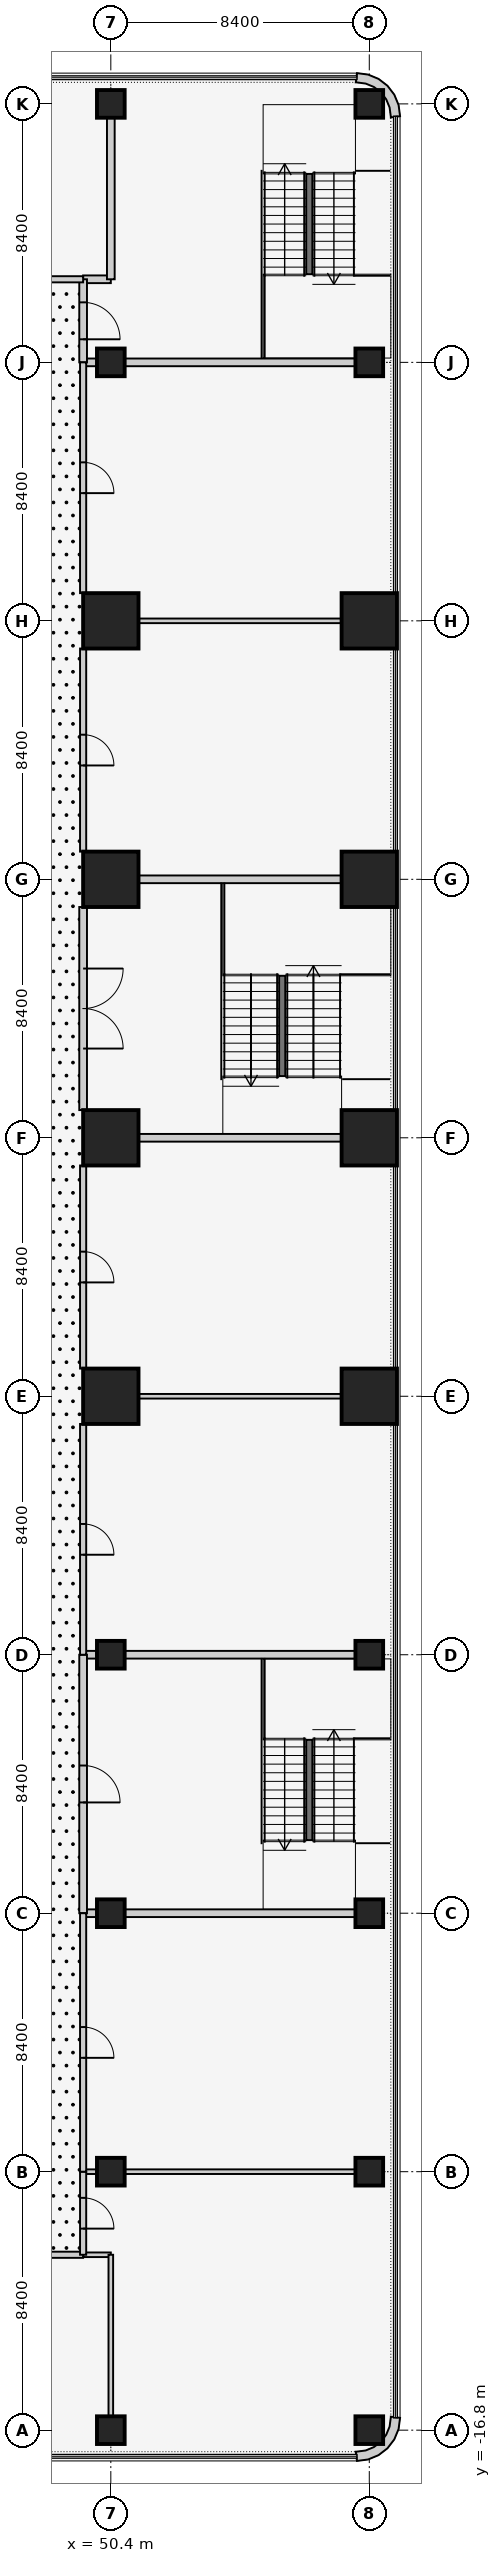
"""IFC4 building model, lengths in metres.
Left out: names, types, materials, properties, quantities, classifications, styles, units other than length and angle.
Written with IfcOpenShell. Run it as: python <this file> out.ifc"""

import sys

from ifc_helpers import new_model, si_unit, direction, frame, frame_2d, origin, origin_2d, place, context, subcontext, project, spatial, polyline, rectangle, outline, extrude, element, fill, save


model = new_model("IFC4")
c1 = context("Model", 3, precision=1e-05, world=origin(), true_north=direction((0.0, 1.0)))
c2 = subcontext(c1, "Body", "Model", "MODEL_VIEW")
j1 = project(units=[si_unit("LENGTHUNIT", "METRE"), si_unit("PLANEANGLEUNIT", "RADIAN")], contexts=[c1])
p1 = place(None, origin())
s1 = spatial("IfcSite", under=j1, at=p1, CompositionType="ELEMENT")
p2 = place(p1, origin())
s2 = spatial("IfcBuilding", under=s1, at=p2, CompositionType="ELEMENT")
p3 = place(p2, frame((0.0, 0.0, 6.0)))
s3 = spatial("IfcBuildingStorey", under=s2, at=p3, CompositionType="ELEMENT", Elevation=6.0)
for number, where, z_axis, x_axis in (
    (1, (50.4, -16.8, 0.0), (0.0, 0.0, 1.0), (1.0, 0.0, 0.0)),
    (2, (50.4, -8.4, 0.0), (0.0, 0.0, 1.0), (1.0, 0.0, 0.0)),
    (3, (50.4, 0.0, 0.0), (0.0, 0.0, 1.0), (1.0, 0.0, 0.0)),
    (4, (50.4, 8.4, 0.0), (0.0, 0.0, 1.0), (1.0, 0.0, 0.0)),
):
    element("IfcColumn", number, at=place(p3, frame(where, z_axis=z_axis, x_axis=x_axis)), inside=s3, PredefinedType="COLUMN", context=c2, shape_type="SweptSolid", body=[
        extrude(rectangle(XDim=0.9, YDim=0.9, at=origin_2d()), origin(), (0.0, 0.0, 1.0), 4.5),
    ])
for number, where, z_axis, x_axis in (
    (5, (50.4, 16.8, 0.0), (0.0, 0.0, 1.0), (1.0, 0.0, 0.0)),
    (6, (50.4, 25.2, 0.0), (0.0, 0.0, 1.0), (1.0, 0.0, 0.0)),
    (7, (50.4, 33.6, 0.0), (0.0, 0.0, 1.0), (1.0, 0.0, 0.0)),
    (8, (50.4, 42.0, 0.0), (0.0, 0.0, 1.0), (1.0, 0.0, 0.0)),
):
    element("IfcColumn", number, at=place(p3, frame(where, z_axis=z_axis, x_axis=x_axis)), inside=s3, PredefinedType="COLUMN", context=c2, shape_type="SweptSolid", body=[
        extrude(rectangle(XDim=1.8, YDim=1.8, at=origin_2d()), origin(), (0.0, 0.0, 1.0), 4.5),
    ])
for number, where, z_axis, x_axis in (
    (9, (50.4, 50.4, 0.0), (0.0, 0.0, 1.0), (1.0, 0.0, 0.0)),
    (10, (50.4, 58.8, 0.0), (0.0, 0.0, 1.0), (1.0, 0.0, 0.0)),
    (11, (58.8, -16.8, 0.0), (0.0, 0.0, 1.0), (1.0, 0.0, 0.0)),
    (12, (58.8, -8.4, 0.0), (0.0, 0.0, 1.0), (1.0, 0.0, 0.0)),
    (13, (58.8, 0.0, 0.0), (0.0, 0.0, 1.0), (1.0, 0.0, 0.0)),
    (14, (58.8, 8.4, 0.0), (0.0, 0.0, 1.0), (1.0, 0.0, 0.0)),
):
    element("IfcColumn", number, at=place(p3, frame(where, z_axis=z_axis, x_axis=x_axis)), inside=s3, PredefinedType="COLUMN", context=c2, shape_type="SweptSolid", body=[
        extrude(rectangle(XDim=0.9, YDim=0.9, at=origin_2d()), origin(), (0.0, 0.0, 1.0), 4.5),
    ])
for number, where, z_axis, x_axis in (
    (15, (58.8, 16.8, 0.0), (0.0, 0.0, 1.0), (1.0, 0.0, 0.0)),
    (16, (58.8, 25.2, 0.0), (0.0, 0.0, 1.0), (1.0, 0.0, 0.0)),
    (17, (58.8, 33.6, 0.0), (0.0, 0.0, 1.0), (1.0, 0.0, 0.0)),
    (18, (58.8, 42.0, 0.0), (0.0, 0.0, 1.0), (1.0, 0.0, 0.0)),
):
    element("IfcColumn", number, at=place(p3, frame(where, z_axis=z_axis, x_axis=x_axis)), inside=s3, PredefinedType="COLUMN", context=c2, shape_type="SweptSolid", body=[
        extrude(rectangle(XDim=1.8, YDim=1.8, at=origin_2d()), origin(), (0.0, 0.0, 1.0), 4.5),
    ])
for number, where, z_axis, x_axis in (
    (19, (58.8, 50.4, 0.0), (0.0, 0.0, 1.0), (1.0, 0.0, 0.0)),
    (20, (58.8, 58.8, 0.0), (0.0, 0.0, 1.0), (1.0, 0.0, 0.0)),
):
    element("IfcColumn", number, at=place(p3, frame(where, z_axis=z_axis, x_axis=x_axis)), inside=s3, PredefinedType="COLUMN", context=c2, shape_type="SweptSolid", body=[
        extrude(rectangle(XDim=0.9, YDim=0.9, at=origin_2d()), origin(), (0.0, 0.0, 1.0), 4.5),
    ])
p4 = place(p3, frame((59.648, 58.355, 0.0), z_axis=(0.0, 0.0, 1.0), x_axis=(0.707106781187, 0.707106781187, 0.0)))
e21 = element("IfcWall", 21, at=p4, inside=s3, PredefinedType="SOLIDWALL", context=c2, shape_type="SweptSolid", body=[
    extrude(outline(polyline([(0.139, 1.904), (-0.101, 1.72), (-0.087, 1.706), (0.1, 1.463), (0.209, 1.198), (0.246, 0.914), (0.209, 0.63), (0.1, 0.365), (-0.087, 0.122), (-0.101, 0.108), (0.139, -0.076), (0.362, 0.214), (0.502, 0.552), (0.549, 0.914), (0.502, 1.276), (0.362, 1.614), (0.139, 1.904)])), origin(), (0.0, 0.0, 1.0), 4.3),
])
p5 = place(p3, frame((58.355, -17.648, 0.0), z_axis=(0.0, 0.0, 1.0), x_axis=(0.707106781187, -0.707106781187, 0.0)))
e22 = element("IfcWall", 22, at=p5, inside=s3, PredefinedType="SOLIDWALL", context=c2, shape_type="SweptSolid", body=[
    extrude(outline(polyline([(0.139, 1.904), (-0.101, 1.72), (-0.087, 1.706), (0.1, 1.463), (0.209, 1.198), (0.246, 0.914), (0.209, 0.63), (0.1, 0.365), (-0.087, 0.122), (-0.101, 0.108), (0.139, -0.076), (0.362, 0.214), (0.502, 0.552), (0.549, 0.914), (0.502, 1.276), (0.362, 1.614), (0.139, 1.904)])), origin(), (0.0, 0.0, 1.0), 4.3),
])
for number, where, z_axis, x_axis in (
    (23, (57.9, 25.2, 0.0), (0.0, 0.0, 1.0), (-1.0, 0.0, 0.0)),
    (24, (51.3, 33.6, 0.0), (0.0, 0.0, 1.0), (1.0, 0.0, 0.0)),
):
    element("IfcWall", number, at=place(p3, frame(where, z_axis=z_axis, x_axis=x_axis)), inside=s3, PredefinedType="SOLIDWALL", context=c2, shape_type="SweptSolid", body=[
        extrude(rectangle(XDim=6.6, YDim=0.25, at=frame_2d((3.3, 0.0))), origin(), (0.0, 0.0, 1.0), 3.543),
    ])
p6 = place(p3, frame((49.5, 26.1, 0.0), z_axis=(0.0, 0.0, 1.0), x_axis=(0.0, 1.0, 0.0)))
e25 = element("IfcWall", 25, at=p6, inside=s3, PredefinedType="SOLIDWALL", context=c2, shape_type="SweptSolid", body=[
    extrude(rectangle(XDim=6.6, YDim=0.25, at=frame_2d((3.3, 0.0))), origin(), (0.0, 0.0, 1.0), 4.3),
])
p7 = place(p6, frame((2.0, 0.0, 0.0)))
e26 = element("IfcOpeningElement", 26, at=p7, cuts=e25, PredefinedType="OPENING", context=c2, shape_type="SweptSolid", body=[
    extrude(rectangle(XDim=2.6, YDim=2.4, at=frame_2d((1.3, 1.2))), frame((0.0, 0.135, 0.0), z_axis=(0.0, -1.0, 0.0), x_axis=(1.0, 0.0, 0.0)), (0.0, 0.0, 1.0), 0.27),
])
p8 = place(p3, frame((49.95, 0.0, 0.0), z_axis=(0.0, 0.0, 1.0), x_axis=(-1.0, 0.0, 0.0)))
e27 = element("IfcWall", 27, at=p8, inside=s3, PredefinedType="SOLIDWALL", context=c2, shape_type="SweptSolid", body=[
    extrude(rectangle(XDim=0.45, YDim=0.25, at=frame_2d((0.225, 0.0))), origin(), (0.0, 0.0, 1.0), 3.543),
])
p9 = place(p3, frame((58.35, 0.0, 0.0), z_axis=(0.0, 0.0, 1.0), x_axis=(-1.0, 0.0, 0.0)))
e28 = element("IfcWall", 28, at=p9, inside=s3, PredefinedType="SOLIDWALL", context=c2, shape_type="SweptSolid", body=[
    extrude(rectangle(XDim=7.5, YDim=0.25, at=frame_2d((3.75, 0.0))), origin(), (0.0, 0.0, 1.0), 3.543),
])
p10 = place(p3, frame((49.5, 8.4, 0.0), z_axis=(0.0, 0.0, 1.0), x_axis=(1.0, 0.0, 0.0)))
e29 = element("IfcWall", 29, at=p10, inside=s3, PredefinedType="SOLIDWALL", context=c2, shape_type="SweptSolid", body=[
    extrude(rectangle(XDim=0.45, YDim=0.25, at=frame_2d((0.225, 0.0))), origin(), (0.0, 0.0, 1.0), 3.543),
])
p11 = place(p3, frame((50.85, 8.4, 0.0), z_axis=(0.0, 0.0, 1.0), x_axis=(1.0, 0.0, 0.0)))
e30 = element("IfcWall", 30, at=p11, inside=s3, PredefinedType="SOLIDWALL", context=c2, shape_type="SweptSolid", body=[
    extrude(rectangle(XDim=7.5, YDim=0.25, at=frame_2d((3.75, 0.0))), origin(), (0.0, 0.0, 1.0), 3.543),
])
p12 = place(p3, frame((49.5, 0.0, 0.0), z_axis=(0.0, 0.0, 1.0), x_axis=(0.0, 1.0, 0.0)))
e31 = element("IfcWall", 31, at=p12, inside=s3, PredefinedType="SOLIDWALL", context=c2, shape_type="SweptSolid", body=[
    extrude(rectangle(XDim=8.4, YDim=0.25, at=frame_2d((4.2, 0.0))), origin(), (0.0, 0.0, 1.0), 4.3),
])
p13 = place(p12, frame((3.6, 0.0, 0.0)))
e32 = element("IfcOpeningElement", 32, at=p13, cuts=e31, PredefinedType="OPENING", context=c2, shape_type="SweptSolid", body=[
    extrude(rectangle(XDim=1.2, YDim=2.1, at=frame_2d((0.6, 1.05))), frame((0.0, 0.135, 0.0), z_axis=(0.0, -1.0, 0.0), x_axis=(1.0, 0.0, 0.0)), (0.0, 0.0, 1.0), 0.27),
])
p14 = place(p3, frame((49.95, 50.4, 0.0), z_axis=(0.0, 0.0, 1.0), x_axis=(-1.0, 0.0, 0.0)))
e33 = element("IfcWall", 33, at=p14, inside=s3, PredefinedType="SOLIDWALL", context=c2, shape_type="SweptSolid", body=[
    extrude(rectangle(XDim=0.45, YDim=0.25, at=frame_2d((0.225, 0.0))), origin(), (0.0, 0.0, 1.0), 3.543),
])
p15 = place(p3, frame((58.35, 50.4, 0.0), z_axis=(0.0, 0.0, 1.0), x_axis=(-1.0, 0.0, 0.0)))
e34 = element("IfcWall", 34, at=p15, inside=s3, PredefinedType="SOLIDWALL", context=c2, shape_type="SweptSolid", body=[
    extrude(rectangle(XDim=7.5, YDim=0.25, at=frame_2d((3.75, 0.0))), origin(), (0.0, 0.0, 1.0), 3.543),
])
p16 = place(p3, frame((49.5, 53.1, 0.0), z_axis=(0.0, 0.0, 1.0), x_axis=(1.0, 0.0, 0.0)))
e35 = element("IfcWall", 35, at=p16, inside=s3, PredefinedType="SOLIDWALL", context=c2, shape_type="SweptSolid", body=[
    extrude(rectangle(XDim=0.9, YDim=0.25, at=frame_2d((0.45, 0.0))), origin(), (0.0, 0.0, 1.0), 4.3),
])
p17 = place(p3, frame((50.4, 53.1, 0.0), z_axis=(0.0, 0.0, 1.0), x_axis=(0.0, 1.0, 0.0)))
e36 = element("IfcWall", 36, at=p17, inside=s3, PredefinedType="SOLIDWALL", context=c2, shape_type="SweptSolid", body=[
    extrude(rectangle(XDim=5.25, YDim=0.25, at=frame_2d((2.625, 0.0))), origin(), (0.0, 0.0, 1.0), 3.543),
])
p18 = place(p3, frame((49.5, 50.4, 0.0), z_axis=(0.0, 0.0, 1.0), x_axis=(0.0, 1.0, 0.0)))
e37 = element("IfcWall", 37, at=p18, inside=s3, PredefinedType="SOLIDWALL", context=c2, shape_type="SweptSolid", body=[
    extrude(rectangle(XDim=2.7, YDim=0.25, at=frame_2d((1.35, 0.0))), origin(), (0.0, 0.0, 1.0), 4.3),
])
p19 = place(p18, frame((0.75, 0.0, 0.0)))
e38 = element("IfcOpeningElement", 38, at=p19, cuts=e37, PredefinedType="OPENING", context=c2, shape_type="SweptSolid", body=[
    extrude(rectangle(XDim=1.2, YDim=2.1, at=frame_2d((0.6, 1.05))), frame((0.0, 0.135, 0.0), z_axis=(0.0, -1.0, 0.0), x_axis=(1.0, 0.0, 0.0)), (0.0, 0.0, 1.0), 0.27),
])
p20 = place(p3, frame((49.5, -11.1, 0.0), z_axis=(0.0, 0.0, 1.0), x_axis=(1.0, 0.0, 0.0)))
e39 = element("IfcWall", 39, at=p20, inside=s3, PredefinedType="PARTITIONING", context=c2, shape_type="SweptSolid", body=[
    extrude(rectangle(XDim=0.9, YDim=0.15, at=frame_2d((0.45, 0.0))), origin(), (0.0, 0.0, 1.0), 4.3),
])
p21 = place(p3, frame((50.4, -11.1, 0.0), z_axis=(0.0, 0.0, 1.0), x_axis=(0.0, -1.0, 0.0)))
e40 = element("IfcWall", 40, at=p21, inside=s3, PredefinedType="PARTITIONING", context=c2, shape_type="SweptSolid", body=[
    extrude(rectangle(XDim=5.25, YDim=0.15, at=frame_2d((2.625, 0.0))), origin(), (0.0, 0.0, 1.0), 3.543),
])
p22 = place(p3, frame((47.1, -11.1, 0.0), z_axis=(0.0, 0.0, 1.0), x_axis=(1.0, 0.0, 0.0)))
e41 = element("IfcWall", 41, at=p22, inside=s3, PredefinedType="PARTITIONING", context=c2, shape_type="SweptSolid", body=[
    extrude(rectangle(XDim=2.4, YDim=0.2, at=frame_2d((1.2, 0.0))), origin(), (0.0, 0.0, 1.0), 4.3),
])
p23 = place(p3, frame((49.5, -8.4, 0.0), z_axis=(0.0, 0.0, 1.0), x_axis=(1.0, 0.0, 0.0)))
e42 = element("IfcWall", 42, at=p23, inside=s3, PredefinedType="PARTITIONING", context=c2, shape_type="SweptSolid", body=[
    extrude(rectangle(XDim=0.45, YDim=0.15, at=frame_2d((0.225, 0.0))), origin(), (0.0, 0.0, 1.0), 3.543),
])
p24 = place(p3, frame((50.85, -8.4, 0.0), z_axis=(0.0, 0.0, 1.0), x_axis=(1.0, 0.0, 0.0)))
e43 = element("IfcWall", 43, at=p24, inside=s3, PredefinedType="PARTITIONING", context=c2, shape_type="SweptSolid", body=[
    extrude(rectangle(XDim=7.5, YDim=0.15, at=frame_2d((3.75, 0.0))), origin(), (0.0, 0.0, 1.0), 3.543),
])
p25 = place(p3, frame((49.5, -11.1, 0.0), z_axis=(0.0, 0.0, 1.0), x_axis=(0.0, 1.0, 0.0)))
e44 = element("IfcWall", 44, at=p25, inside=s3, PredefinedType="PARTITIONING", context=c2, shape_type="SweptSolid", body=[
    extrude(rectangle(XDim=2.7, YDim=0.2, at=frame_2d((1.35, 0.0))), origin(), (0.0, 0.0, 1.0), 4.3),
])
p26 = place(p25, frame((0.85, 0.0, 0.0)))
e45 = element("IfcOpeningElement", 45, at=p26, cuts=e44, PredefinedType="OPENING", context=c2, shape_type="SweptSolid", body=[
    extrude(rectangle(XDim=1.0, YDim=2.1, at=frame_2d((0.5, 1.05))), frame((0.0, 0.11, 0.0), z_axis=(0.0, -1.0, 0.0), x_axis=(1.0, 0.0, 0.0)), (0.0, 0.0, 1.0), 0.22),
])
p27 = place(p3, frame((49.5, -8.4, 0.0), z_axis=(0.0, 0.0, 1.0), x_axis=(0.0, 1.0, 0.0)))
e46 = element("IfcWall", 46, at=p27, inside=s3, PredefinedType="PARTITIONING", context=c2, shape_type="SweptSolid", body=[
    extrude(rectangle(XDim=8.4, YDim=0.2, at=frame_2d((4.2, 0.0))), origin(), (0.0, 0.0, 1.0), 4.3),
])
p28 = place(p27, frame((3.7, 0.0, 0.0)))
e47 = element("IfcOpeningElement", 47, at=p28, cuts=e46, PredefinedType="OPENING", context=c2, shape_type="SweptSolid", body=[
    extrude(rectangle(XDim=1.0, YDim=2.1, at=frame_2d((0.5, 1.05))), frame((0.0, 0.11, 0.0), z_axis=(0.0, -1.0, 0.0), x_axis=(1.0, 0.0, 0.0)), (0.0, 0.0, 1.0), 0.22),
])
p29 = place(p3, frame((51.3, 16.8, 0.0), z_axis=(0.0, 0.0, 1.0), x_axis=(1.0, 0.0, 0.0)))
e48 = element("IfcWall", 48, at=p29, inside=s3, PredefinedType="PARTITIONING", context=c2, shape_type="SweptSolid", body=[
    extrude(rectangle(XDim=6.6, YDim=0.15, at=frame_2d((3.3, 0.0))), origin(), (0.0, 0.0, 1.0), 3.543),
])
p30 = place(p3, frame((49.5, 8.4, 0.0), z_axis=(0.0, 0.0, 1.0), x_axis=(0.0, 1.0, 0.0)))
e49 = element("IfcWall", 49, at=p30, inside=s3, PredefinedType="PARTITIONING", context=c2, shape_type="SweptSolid", body=[
    extrude(rectangle(XDim=7.5, YDim=0.2, at=frame_2d((3.75, 0.0))), origin(), (0.0, 0.0, 1.0), 4.3),
])
p31 = place(p30, frame((3.25, 0.0, 0.0)))
e50 = element("IfcOpeningElement", 50, at=p31, cuts=e49, PredefinedType="OPENING", context=c2, shape_type="SweptSolid", body=[
    extrude(rectangle(XDim=1.0, YDim=2.1, at=frame_2d((0.5, 1.05))), frame((0.0, 0.11, 0.0), z_axis=(0.0, -1.0, 0.0), x_axis=(1.0, 0.0, 0.0)), (0.0, 0.0, 1.0), 0.22),
])
p32 = place(p3, frame((49.5, 17.7, 0.0), z_axis=(0.0, 0.0, 1.0), x_axis=(0.0, 1.0, 0.0)))
e51 = element("IfcWall", 51, at=p32, inside=s3, PredefinedType="PARTITIONING", context=c2, shape_type="SweptSolid", body=[
    extrude(rectangle(XDim=6.6, YDim=0.2, at=frame_2d((3.3, 0.0))), origin(), (0.0, 0.0, 1.0), 4.3),
])
p33 = place(p32, frame((2.8, 0.0, 0.0)))
e52 = element("IfcOpeningElement", 52, at=p33, cuts=e51, PredefinedType="OPENING", context=c2, shape_type="SweptSolid", body=[
    extrude(rectangle(XDim=1.0, YDim=2.1, at=frame_2d((0.5, 1.05))), frame((0.0, 0.11, 0.0), z_axis=(0.0, -1.0, 0.0), x_axis=(1.0, 0.0, 0.0)), (0.0, 0.0, 1.0), 0.22),
])
p34 = place(p3, frame((51.3, 42.0, 0.0), z_axis=(0.0, 0.0, 1.0), x_axis=(1.0, 0.0, 0.0)))
e53 = element("IfcWall", 53, at=p34, inside=s3, PredefinedType="PARTITIONING", context=c2, shape_type="SweptSolid", body=[
    extrude(rectangle(XDim=6.6, YDim=0.15, at=frame_2d((3.3, 0.0))), origin(), (0.0, 0.0, 1.0), 3.543),
])
p35 = place(p3, frame((49.5, 34.5, 0.0), z_axis=(0.0, 0.0, 1.0), x_axis=(0.0, 1.0, 0.0)))
e54 = element("IfcWall", 54, at=p35, inside=s3, PredefinedType="PARTITIONING", context=c2, shape_type="SweptSolid", body=[
    extrude(rectangle(XDim=6.6, YDim=0.2, at=frame_2d((3.3, 0.0))), origin(), (0.0, 0.0, 1.0), 4.3),
])
p36 = place(p35, frame((2.8, 0.0, 0.0)))
e55 = element("IfcOpeningElement", 55, at=p36, cuts=e54, PredefinedType="OPENING", context=c2, shape_type="SweptSolid", body=[
    extrude(rectangle(XDim=1.0, YDim=2.1, at=frame_2d((0.5, 1.05))), frame((0.0, 0.11, 0.0), z_axis=(0.0, -1.0, 0.0), x_axis=(1.0, 0.0, 0.0)), (0.0, 0.0, 1.0), 0.22),
])
p37 = place(p3, frame((49.5, 42.9, 0.0), z_axis=(0.0, 0.0, 1.0), x_axis=(0.0, 1.0, 0.0)))
e56 = element("IfcWall", 56, at=p37, inside=s3, PredefinedType="PARTITIONING", context=c2, shape_type="SweptSolid", body=[
    extrude(rectangle(XDim=7.5, YDim=0.2, at=frame_2d((3.75, 0.0))), origin(), (0.0, 0.0, 1.0), 4.3),
])
p38 = place(p37, frame((3.25, 0.0, 0.0)))
e57 = element("IfcOpeningElement", 57, at=p38, cuts=e56, PredefinedType="OPENING", context=c2, shape_type="SweptSolid", body=[
    extrude(rectangle(XDim=1.0, YDim=2.1, at=frame_2d((0.5, 1.05))), frame((0.0, 0.11, 0.0), z_axis=(0.0, -1.0, 0.0), x_axis=(1.0, 0.0, 0.0)), (0.0, 0.0, 1.0), 0.22),
])
p39 = place(p3, frame((49.5, 53.1, 0.0), z_axis=(0.0, 0.0, 1.0), x_axis=(-1.0, 0.0, 0.0)))
e58 = element("IfcWall", 58, at=p39, inside=s3, PredefinedType="PARTITIONING", context=c2, shape_type="SweptSolid", body=[
    extrude(rectangle(XDim=2.4, YDim=0.2, at=frame_2d((1.2, 0.0))), origin(), (0.0, 0.0, 1.0), 4.3),
])
for number, where, z_axis, x_axis in (
    (59, (55.97, 27.205, 0.0), (0.0, 0.0, 1.0), (0.0, 1.0, 0.0)),
    (60, (56.85, 2.375, 0.0), (0.0, 0.0, 1.0), (0.0, 1.0, 0.0)),
    (61, (56.85, 56.525, 0.0), (0.0, 0.0, 1.0), (0.0, -1.0, 0.0)),
):
    element("IfcWall", number, at=place(p3, frame(where, z_axis=z_axis, x_axis=x_axis)), inside=s3, PredefinedType="SOLIDWALL", context=c2, shape_type="SweptSolid", body=[
        extrude(rectangle(XDim=3.26, YDim=0.2, at=frame_2d((1.63, 0.0))), origin(), (0.0, 0.0, 1.0), 4.5),
    ])
p40 = place(p7, frame((2.6, 0.0, 0.0), z_axis=(0.0, 0.0, 1.0), x_axis=(-1.0, 0.0, 0.0)))
e62 = element("IfcDoor", 62, at=p40, inside=s3, OperationType="DOUBLE_DOOR_SINGLE_SWING", PredefinedType="DOOR", context=c2, shape_type="SweptSolid", body=[
    extrude(rectangle(XDim=2.6, YDim=2.4, at=frame_2d((1.3, 1.2))), frame((0.0, 0.025, 0.0), z_axis=(0.0, -1.0, 0.0), x_axis=(1.0, 0.0, 0.0)), (0.0, 0.0, 1.0), 0.05),
])
fill(e26, e62)
p41 = place(p13, frame((1.2, 0.0, 0.0), z_axis=(0.0, 0.0, 1.0), x_axis=(-1.0, 0.0, 0.0)))
e63 = element("IfcDoor", 63, at=p41, inside=s3, OperationType="SINGLE_SWING_RIGHT", PredefinedType="DOOR", context=c2, shape_type="SweptSolid", body=[
    extrude(rectangle(XDim=1.2, YDim=2.1, at=frame_2d((0.6, 1.05))), frame((0.0, 0.025, 0.0), z_axis=(0.0, -1.0, 0.0), x_axis=(1.0, 0.0, 0.0)), (0.0, 0.0, 1.0), 0.05),
])
fill(e32, e63)
p42 = place(p19, frame((1.2, 0.0, 0.0), z_axis=(0.0, 0.0, 1.0), x_axis=(-1.0, 0.0, 0.0)))
e64 = element("IfcDoor", 64, at=p42, inside=s3, OperationType="SINGLE_SWING_RIGHT", PredefinedType="DOOR", context=c2, shape_type="SweptSolid", body=[
    extrude(rectangle(XDim=1.2, YDim=2.1, at=frame_2d((0.6, 1.05))), frame((0.0, 0.025, 0.0), z_axis=(0.0, -1.0, 0.0), x_axis=(1.0, 0.0, 0.0)), (0.0, 0.0, 1.0), 0.05),
])
fill(e38, e64)
p43 = place(p26, frame((1.0, 0.0, 0.0), z_axis=(0.0, 0.0, 1.0), x_axis=(-1.0, 0.0, 0.0)))
e65 = element("IfcDoor", 65, at=p43, inside=s3, OperationType="SINGLE_SWING_RIGHT", PredefinedType="DOOR", context=c2, shape_type="SweptSolid", body=[
    extrude(rectangle(XDim=1.0, YDim=2.1, at=frame_2d((0.5, 1.05))), frame((0.0, 0.025, 0.0), z_axis=(0.0, -1.0, 0.0), x_axis=(1.0, 0.0, 0.0)), (0.0, 0.0, 1.0), 0.05),
])
fill(e45, e65)
p44 = place(p28, frame((1.0, 0.0, 0.0), z_axis=(0.0, 0.0, 1.0), x_axis=(-1.0, 0.0, 0.0)))
e66 = element("IfcDoor", 66, at=p44, inside=s3, OperationType="SINGLE_SWING_RIGHT", PredefinedType="DOOR", context=c2, shape_type="SweptSolid", body=[
    extrude(rectangle(XDim=1.0, YDim=2.1, at=frame_2d((0.5, 1.05))), frame((0.0, 0.025, 0.0), z_axis=(0.0, -1.0, 0.0), x_axis=(1.0, 0.0, 0.0)), (0.0, 0.0, 1.0), 0.05),
])
fill(e47, e66)
p45 = place(p31, frame((1.0, 0.0, 0.0), z_axis=(0.0, 0.0, 1.0), x_axis=(-1.0, 0.0, 0.0)))
e67 = element("IfcDoor", 67, at=p45, inside=s3, OperationType="SINGLE_SWING_RIGHT", PredefinedType="DOOR", context=c2, shape_type="SweptSolid", body=[
    extrude(rectangle(XDim=1.0, YDim=2.1, at=frame_2d((0.5, 1.05))), frame((0.0, 0.025, 0.0), z_axis=(0.0, -1.0, 0.0), x_axis=(1.0, 0.0, 0.0)), (0.0, 0.0, 1.0), 0.05),
])
fill(e50, e67)
p46 = place(p33, frame((1.0, 0.0, 0.0), z_axis=(0.0, 0.0, 1.0), x_axis=(-1.0, 0.0, 0.0)))
e68 = element("IfcDoor", 68, at=p46, inside=s3, OperationType="SINGLE_SWING_RIGHT", PredefinedType="DOOR", context=c2, shape_type="SweptSolid", body=[
    extrude(rectangle(XDim=1.0, YDim=2.1, at=frame_2d((0.5, 1.05))), frame((0.0, 0.025, 0.0), z_axis=(0.0, -1.0, 0.0), x_axis=(1.0, 0.0, 0.0)), (0.0, 0.0, 1.0), 0.05),
])
fill(e52, e68)
p47 = place(p36, frame((1.0, 0.0, 0.0), z_axis=(0.0, 0.0, 1.0), x_axis=(-1.0, 0.0, 0.0)))
e69 = element("IfcDoor", 69, at=p47, inside=s3, OperationType="SINGLE_SWING_RIGHT", PredefinedType="DOOR", context=c2, shape_type="SweptSolid", body=[
    extrude(rectangle(XDim=1.0, YDim=2.1, at=frame_2d((0.5, 1.05))), frame((0.0, 0.025, 0.0), z_axis=(0.0, -1.0, 0.0), x_axis=(1.0, 0.0, 0.0)), (0.0, 0.0, 1.0), 0.05),
])
fill(e55, e69)
p48 = place(p38, frame((1.0, 0.0, 0.0), z_axis=(0.0, 0.0, 1.0), x_axis=(-1.0, 0.0, 0.0)))
e70 = element("IfcDoor", 70, at=p48, inside=s3, OperationType="SINGLE_SWING_RIGHT", PredefinedType="DOOR", context=c2, shape_type="SweptSolid", body=[
    extrude(rectangle(XDim=1.0, YDim=2.1, at=frame_2d((0.5, 1.05))), frame((0.0, 0.025, 0.0), z_axis=(0.0, -1.0, 0.0), x_axis=(1.0, 0.0, 0.0)), (0.0, 0.0, 1.0), 0.05),
])
fill(e57, e70)
save(model, sys.argv[1])
